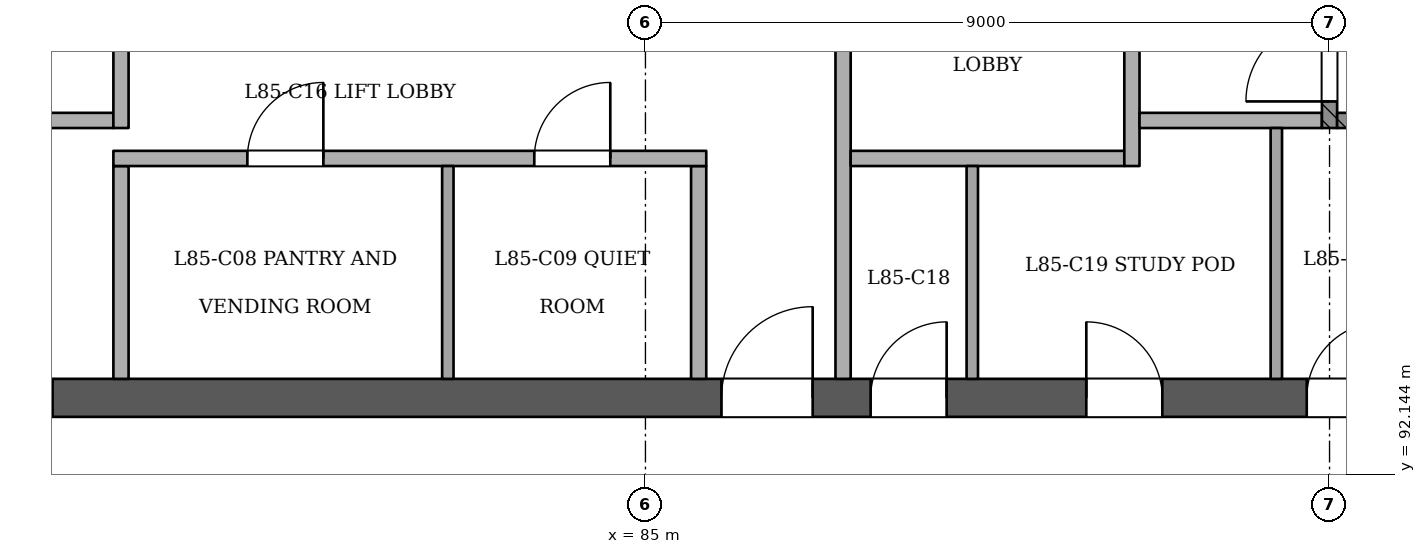
"""IFC4 building model, lengths in metres.
Left out: names, types, materials, properties, quantities, classifications, styles, units other than length and angle.
Written with IfcOpenShell. Run it as: python <this file> out.ifc"""

import sys

from ifc_helpers import new_model, si_unit, direction, frame, frame_2d, origin, place, context, subcontext, project, spatial, rectangle, extrude, element, fill, save


model = new_model("IFC4")
c1 = context("Model", 3, precision=1e-05, world=origin(), true_north=direction((0.0, 1.0)))
c2 = subcontext(c1, "Body", "Model", "MODEL_VIEW")
j1 = project(units=[si_unit("LENGTHUNIT", "METRE"), si_unit("PLANEANGLEUNIT", "RADIAN")], contexts=[c1])
p1 = place(None, origin())
s1 = spatial("IfcSite", under=j1, at=p1, CompositionType="ELEMENT")
p2 = place(p1, origin())
s2 = spatial("IfcBuilding", under=s1, at=p2, CompositionType="ELEMENT")
p3 = place(p2, frame((0.0, 0.0, 327.4)))
s3 = spatial("IfcBuildingStorey", under=s2, at=p3, CompositionType="ELEMENT", Elevation=327.4)
p4 = place(p3, frame((72.75, 93.15, 0.0), z_axis=(0.0, 0.0, 1.0), x_axis=(1.0, 0.0, 0.0)))
e1 = element("IfcWall", 1, at=p4, inside=s3, PredefinedType="SHEAR", context=c2, shape_type="SweptSolid", body=[
    extrude(rectangle(XDim=24.75, YDim=0.5, at=frame_2d((12.375, 0.0))), origin(), (0.0, 0.0, 1.0), 3.6),
])
p5 = place(p4, frame((1.05, 0.0, 0.0)))
e2 = element("IfcOpeningElement", 2, at=p5, cuts=e1, PredefinedType="OPENING", context=c2, shape_type="SweptSolid", body=[
    extrude(rectangle(XDim=1.2, YDim=2.1, at=frame_2d((0.6, 1.05))), frame((0.0, 0.26, 0.0), z_axis=(0.0, -1.0, 0.0), x_axis=(1.0, 0.0, 0.0)), (0.0, 0.0, 1.0), 0.521),
])
p6 = place(p4, frame((3.25, 0.0, 0.0)))
e3 = element("IfcOpeningElement", 3, at=p6, cuts=e1, PredefinedType="OPENING", context=c2, shape_type="SweptSolid", body=[
    extrude(rectangle(XDim=1.2, YDim=2.1, at=frame_2d((0.6, 1.05))), frame((0.0, 0.26, 0.0), z_axis=(0.0, -1.0, 0.0), x_axis=(1.0, 0.0, 0.0)), (0.0, 0.0, 1.0), 0.521),
])
p7 = place(p4, frame((13.25, 0.0, 0.0)))
e4 = element("IfcOpeningElement", 4, at=p7, cuts=e1, PredefinedType="OPENING", context=c2, shape_type="SweptSolid", body=[
    extrude(rectangle(XDim=1.2, YDim=2.1, at=frame_2d((0.6, 1.05))), frame((0.0, 0.26, 0.0), z_axis=(0.0, -1.0, 0.0), x_axis=(1.0, 0.0, 0.0)), (0.0, 0.0, 1.0), 0.521),
])
p8 = place(p4, frame((15.212, 0.0, 0.0)))
e5 = element("IfcOpeningElement", 5, at=p8, cuts=e1, PredefinedType="OPENING", context=c2, shape_type="SweptSolid", body=[
    extrude(rectangle(XDim=1.0, YDim=2.1, at=frame_2d((0.5, 1.05))), frame((0.0, 0.26, 0.0), z_axis=(0.0, -1.0, 0.0), x_axis=(1.0, 0.0, 0.0)), (0.0, 0.0, 1.0), 0.521),
])
p9 = place(p4, frame((18.05, 0.0, 0.0)))
e6 = element("IfcOpeningElement", 6, at=p9, cuts=e1, PredefinedType="OPENING", context=c2, shape_type="SweptSolid", body=[
    extrude(rectangle(XDim=1.0, YDim=2.1, at=frame_2d((0.5, 1.05))), frame((0.0, 0.26, 0.0), z_axis=(0.0, -1.0, 0.0), x_axis=(1.0, 0.0, 0.0)), (0.0, 0.0, 1.0), 0.521),
])
p10 = place(p4, frame((20.95, 0.0, 0.0)))
e7 = element("IfcOpeningElement", 7, at=p10, cuts=e1, PredefinedType="OPENING", context=c2, shape_type="SweptSolid", body=[
    extrude(rectangle(XDim=1.0, YDim=2.1, at=frame_2d((0.5, 1.05))), frame((0.0, 0.26, 0.0), z_axis=(0.0, -1.0, 0.0), x_axis=(1.0, 0.0, 0.0)), (0.0, 0.0, 1.0), 0.521),
])
p11 = place(p4, frame((22.837, 0.0, 0.0)))
e8 = element("IfcOpeningElement", 8, at=p11, cuts=e1, PredefinedType="OPENING", context=c2, shape_type="SweptSolid", body=[
    extrude(rectangle(XDim=1.0, YDim=2.1, at=frame_2d((0.5, 1.05))), frame((0.0, 0.26, 0.0), z_axis=(0.0, -1.0, 0.0), x_axis=(1.0, 0.0, 0.0)), (0.0, 0.0, 1.0), 0.521),
])
p12 = place(p3, frame((78.1, 93.4, 0.0), z_axis=(0.0, 0.0, 1.0), x_axis=(0.0, 1.0, 0.0)))
e9 = element("IfcWall", 9, at=p12, inside=s3, PredefinedType="PARTITIONING", context=c2, shape_type="SweptSolid", body=[
    extrude(rectangle(XDim=2.8, YDim=0.2, at=frame_2d((1.4, 0.0))), origin(), (0.0, 0.0, 1.0), 3.2),
])
p13 = place(p3, frame((82.4, 93.4, 0.0), z_axis=(0.0, 0.0, 1.0), x_axis=(0.0, 1.0, 0.0)))
e10 = element("IfcWall", 10, at=p13, inside=s3, PredefinedType="PARTITIONING", context=c2, shape_type="SweptSolid", body=[
    extrude(rectangle(XDim=2.8, YDim=0.15, at=frame_2d((1.4, 0.0))), origin(), (0.0, 0.0, 1.0), 3.2),
])
p14 = place(p3, frame((85.7, 93.4, 0.0), z_axis=(0.0, 0.0, 1.0), x_axis=(0.0, 1.0, 0.0)))
e11 = element("IfcWall", 11, at=p14, inside=s3, PredefinedType="PARTITIONING", context=c2, shape_type="SweptSolid", body=[
    extrude(rectangle(XDim=2.8, YDim=0.2, at=frame_2d((1.4, 0.0))), origin(), (0.0, 0.0, 1.0), 3.2),
])
p15 = place(p3, frame((87.6, 93.4, 0.0), z_axis=(0.0, 0.0, 1.0), x_axis=(0.0, 1.0, 0.0)))
e12 = element("IfcWall", 12, at=p15, inside=s3, PredefinedType="PARTITIONING", context=c2, shape_type="SweptSolid", body=[
    extrude(rectangle(XDim=7.0, YDim=0.2, at=frame_2d((3.5, 0.0))), origin(), (0.0, 0.0, 1.0), 3.2),
])
p16 = place(p15, frame((4.45, 0.0, 0.0)))
e13 = element("IfcOpeningElement", 13, at=p16, cuts=e12, PredefinedType="OPENING", context=c2, shape_type="SweptSolid", body=[
    extrude(rectangle(XDim=1.1, YDim=2.1, at=frame_2d((0.55, 1.05))), frame((0.0, 0.11, 0.0), z_axis=(0.0, -1.0, 0.0), x_axis=(1.0, 0.0, 0.0)), (0.0, 0.0, 1.0), 0.221),
])
p17 = place(p3, frame((89.3, 93.4, 0.0), z_axis=(0.0, 0.0, 1.0), x_axis=(0.0, 1.0, 0.0)))
e14 = element("IfcWall", 14, at=p17, inside=s3, PredefinedType="PARTITIONING", context=c2, shape_type="SweptSolid", body=[
    extrude(rectangle(XDim=2.8, YDim=0.15, at=frame_2d((1.4, 0.0))), origin(), (0.0, 0.0, 1.0), 3.2),
])
p18 = place(p3, frame((93.3, 93.4, 0.0), z_axis=(0.0, 0.0, 1.0), x_axis=(0.0, 1.0, 0.0)))
e15 = element("IfcWall", 15, at=p18, inside=s3, PredefinedType="PARTITIONING", context=c2, shape_type="SweptSolid", body=[
    extrude(rectangle(XDim=3.3, YDim=0.15, at=frame_2d((1.65, 0.0))), origin(), (0.0, 0.0, 1.0), 3.2),
])
p19 = place(p3, frame((78.0, 96.3, 0.0), z_axis=(0.0, 0.0, 1.0), x_axis=(1.0, 0.0, 0.0)))
e16 = element("IfcWall", 16, at=p19, inside=s3, PredefinedType="PARTITIONING", context=c2, shape_type="SweptSolid", body=[
    extrude(rectangle(XDim=7.8, YDim=0.2, at=frame_2d((3.9, 0.0))), origin(), (0.0, 0.0, 1.0), 3.2),
])
p20 = place(p19, frame((1.762, 0.0, 0.0)))
e17 = element("IfcOpeningElement", 17, at=p20, cuts=e16, PredefinedType="OPENING", context=c2, shape_type="SweptSolid", body=[
    extrude(rectangle(XDim=1.0, YDim=2.1, at=frame_2d((0.5, 1.05))), frame((0.0, 0.11, 0.0), z_axis=(0.0, -1.0, 0.0), x_axis=(1.0, 0.0, 0.0)), (0.0, 0.0, 1.0), 0.221),
])
p21 = place(p19, frame((5.538, 0.0, 0.0)))
e18 = element("IfcOpeningElement", 18, at=p21, cuts=e16, PredefinedType="OPENING", context=c2, shape_type="SweptSolid", body=[
    extrude(rectangle(XDim=1.0, YDim=2.1, at=frame_2d((0.5, 1.05))), frame((0.0, 0.11, 0.0), z_axis=(0.0, -1.0, 0.0), x_axis=(1.0, 0.0, 0.0)), (0.0, 0.0, 1.0), 0.221),
])
p22 = place(p3, frame((87.7, 96.3, 0.0), z_axis=(0.0, 0.0, 1.0), x_axis=(1.0, 0.0, 0.0)))
e19 = element("IfcWall", 19, at=p22, inside=s3, PredefinedType="PARTITIONING", context=c2, shape_type="SweptSolid", body=[
    extrude(rectangle(XDim=3.6, YDim=0.2, at=frame_2d((1.8, 0.0))), origin(), (0.0, 0.0, 1.0), 3.2),
])
p23 = place(p3, frame((91.4, 96.2, 0.0), z_axis=(0.0, 0.0, 1.0), x_axis=(0.0, 1.0, 0.0)))
e20 = element("IfcWall", 20, at=p23, inside=s3, PredefinedType="PARTITIONING", context=c2, shape_type="SweptSolid", body=[
    extrude(rectangle(XDim=4.2, YDim=0.2, at=frame_2d((2.1, 0.0))), origin(), (0.0, 0.0, 1.0), 3.2),
])
p24 = place(p23, frame((2.45, 0.0, 0.0)))
e21 = element("IfcOpeningElement", 21, at=p24, cuts=e20, PredefinedType="OPENING", context=c2, shape_type="SweptSolid", body=[
    extrude(rectangle(XDim=1.1, YDim=2.1, at=frame_2d((0.55, 1.05))), frame((0.0, 0.11, 0.0), z_axis=(0.0, -1.0, 0.0), x_axis=(1.0, 0.0, 0.0)), (0.0, 0.0, 1.0), 0.221),
])
p25 = place(p3, frame((76.1, 96.8, 0.0), z_axis=(0.0, 0.0, 1.0), x_axis=(1.0, 0.0, 0.0)))
e22 = element("IfcWall", 22, at=p25, inside=s3, PredefinedType="PARTITIONING", context=c2, shape_type="SweptSolid", body=[
    extrude(rectangle(XDim=1.9, YDim=0.2, at=frame_2d((0.95, 0.0))), origin(), (0.0, 0.0, 1.0), 3.2),
])
p26 = place(p3, frame((78.1, 96.7, 0.0), z_axis=(0.0, 0.0, 1.0), x_axis=(0.0, 1.0, 0.0)))
e23 = element("IfcWall", 23, at=p26, inside=s3, PredefinedType="PARTITIONING", context=c2, shape_type="SweptSolid", body=[
    extrude(rectangle(XDim=3.7, YDim=0.2, at=frame_2d((1.85, 0.0))), origin(), (0.0, 0.0, 1.0), 3.2),
])
p27 = place(p26, frame((1.95, 0.0, 0.0)))
e24 = element("IfcOpeningElement", 24, at=p27, cuts=e23, PredefinedType="OPENING", context=c2, shape_type="SweptSolid", body=[
    extrude(rectangle(XDim=1.1, YDim=2.1, at=frame_2d((0.55, 1.05))), frame((0.0, 0.11, 0.0), z_axis=(0.0, -1.0, 0.0), x_axis=(1.0, 0.0, 0.0)), (0.0, 0.0, 1.0), 0.221),
])
p28 = place(p3, frame((91.5, 96.8, 0.0), z_axis=(0.0, 0.0, 1.0), x_axis=(1.0, 0.0, 0.0)))
e25 = element("IfcWall", 25, at=p28, inside=s3, PredefinedType="PARTITIONING", context=c2, shape_type="SweptSolid", body=[
    extrude(rectangle(XDim=2.4, YDim=0.2, at=frame_2d((1.2, 0.0))), origin(), (0.0, 0.0, 1.0), 3.2),
])
p29 = place(p3, frame((94.0, 96.7, 0.0), z_axis=(0.0, 0.0, 1.0), x_axis=(0.0, 1.0, 0.0)))
e26 = element("IfcWall", 26, at=p29, inside=s3, PredefinedType="SOLIDWALL", context=c2, shape_type="SweptSolid", body=[
    extrude(rectangle(XDim=3.7, YDim=0.2, at=frame_2d((1.85, 0.0))), origin(), (0.0, 0.0, 1.0), 3.2),
])
p30 = place(p29, frame((0.35, 0.0, 0.0)))
e27 = element("IfcOpeningElement", 27, at=p30, cuts=e26, PredefinedType="OPENING", context=c2, shape_type="SweptSolid", body=[
    extrude(rectangle(XDim=1.1, YDim=2.1, at=frame_2d((0.55, 1.05))), frame((0.0, 0.11, 0.0), z_axis=(0.0, -1.0, 0.0), x_axis=(1.0, 0.0, 0.0)), (0.0, 0.0, 1.0), 0.221),
])
p31 = place(p3, frame((94.1, 96.8, 0.0), z_axis=(0.0, 0.0, 1.0), x_axis=(1.0, 0.0, 0.0)))
e28 = element("IfcWall", 28, at=p31, inside=s3, PredefinedType="SOLIDWALL", context=c2, shape_type="SweptSolid", body=[
    extrude(rectangle(XDim=2.9, YDim=0.2, at=frame_2d((1.45, 0.0))), origin(), (0.0, 0.0, 1.0), 3.2),
])
p32 = place(p30, origin())
e29 = element("IfcDoor", 29, at=p32, inside=s3, OperationType="SINGLE_SWING_LEFT", PredefinedType="NOTDEFINED", context=c2, shape_type="SweptSolid", body=[
    extrude(rectangle(XDim=1.1, YDim=2.1, at=frame_2d((0.55, 1.05))), frame((0.0, 0.025, 0.0), z_axis=(0.0, -1.0, 0.0), x_axis=(1.0, 0.0, 0.0)), (0.0, 0.0, 1.0), 0.05),
])
fill(e27, e29)
p33 = place(p6, origin())
e30 = element("IfcDoor", 30, at=p33, inside=s3, OperationType="SINGLE_SWING_LEFT", PredefinedType="NOTDEFINED", context=c2, shape_type="SweptSolid", body=[
    extrude(rectangle(XDim=1.2, YDim=2.1, at=frame_2d((0.6, 1.05))), frame((0.0, 0.025, 0.0), z_axis=(0.0, -1.0, 0.0), x_axis=(1.0, 0.0, 0.0)), (0.0, 0.0, 1.0), 0.05),
])
fill(e3, e30)
p34 = place(p7, origin())
e31 = element("IfcDoor", 31, at=p34, inside=s3, OperationType="SINGLE_SWING_RIGHT", PredefinedType="NOTDEFINED", context=c2, shape_type="SweptSolid", body=[
    extrude(rectangle(XDim=1.2, YDim=2.1, at=frame_2d((0.6, 1.05))), frame((0.0, 0.025, 0.0), z_axis=(0.0, -1.0, 0.0), x_axis=(1.0, 0.0, 0.0)), (0.0, 0.0, 1.0), 0.05),
])
fill(e4, e31)
p35 = place(p8, origin())
e32 = element("IfcDoor", 32, at=p35, inside=s3, OperationType="SINGLE_SWING_RIGHT", PredefinedType="NOTDEFINED", context=c2, shape_type="SweptSolid", body=[
    extrude(rectangle(XDim=1.0, YDim=2.1, at=frame_2d((0.5, 1.05))), frame((0.0, 0.025, 0.0), z_axis=(0.0, -1.0, 0.0), x_axis=(1.0, 0.0, 0.0)), (0.0, 0.0, 1.0), 0.05),
])
fill(e5, e32)
p36 = place(p9, origin())
e33 = element("IfcDoor", 33, at=p36, inside=s3, OperationType="SINGLE_SWING_LEFT", PredefinedType="NOTDEFINED", context=c2, shape_type="SweptSolid", body=[
    extrude(rectangle(XDim=1.0, YDim=2.1, at=frame_2d((0.5, 1.05))), frame((0.0, 0.025, 0.0), z_axis=(0.0, -1.0, 0.0), x_axis=(1.0, 0.0, 0.0)), (0.0, 0.0, 1.0), 0.05),
])
fill(e6, e33)
p37 = place(p10, origin())
e34 = element("IfcDoor", 34, at=p37, inside=s3, OperationType="SINGLE_SWING_RIGHT", PredefinedType="NOTDEFINED", context=c2, shape_type="SweptSolid", body=[
    extrude(rectangle(XDim=1.0, YDim=2.1, at=frame_2d((0.5, 1.05))), frame((0.0, 0.025, 0.0), z_axis=(0.0, -1.0, 0.0), x_axis=(1.0, 0.0, 0.0)), (0.0, 0.0, 1.0), 0.05),
])
fill(e7, e34)
p38 = place(p20, origin())
e35 = element("IfcDoor", 35, at=p38, inside=s3, OperationType="SINGLE_SWING_RIGHT", PredefinedType="NOTDEFINED", context=c2, shape_type="SweptSolid", body=[
    extrude(rectangle(XDim=1.0, YDim=2.1, at=frame_2d((0.5, 1.05))), frame((0.0, 0.025, 0.0), z_axis=(0.0, -1.0, 0.0), x_axis=(1.0, 0.0, 0.0)), (0.0, 0.0, 1.0), 0.05),
])
fill(e17, e35)
p39 = place(p21, origin())
e36 = element("IfcDoor", 36, at=p39, inside=s3, OperationType="SINGLE_SWING_RIGHT", PredefinedType="NOTDEFINED", context=c2, shape_type="SweptSolid", body=[
    extrude(rectangle(XDim=1.0, YDim=2.1, at=frame_2d((0.5, 1.05))), frame((0.0, 0.025, 0.0), z_axis=(0.0, -1.0, 0.0), x_axis=(1.0, 0.0, 0.0)), (0.0, 0.0, 1.0), 0.05),
])
fill(e18, e36)
save(model, sys.argv[1])
